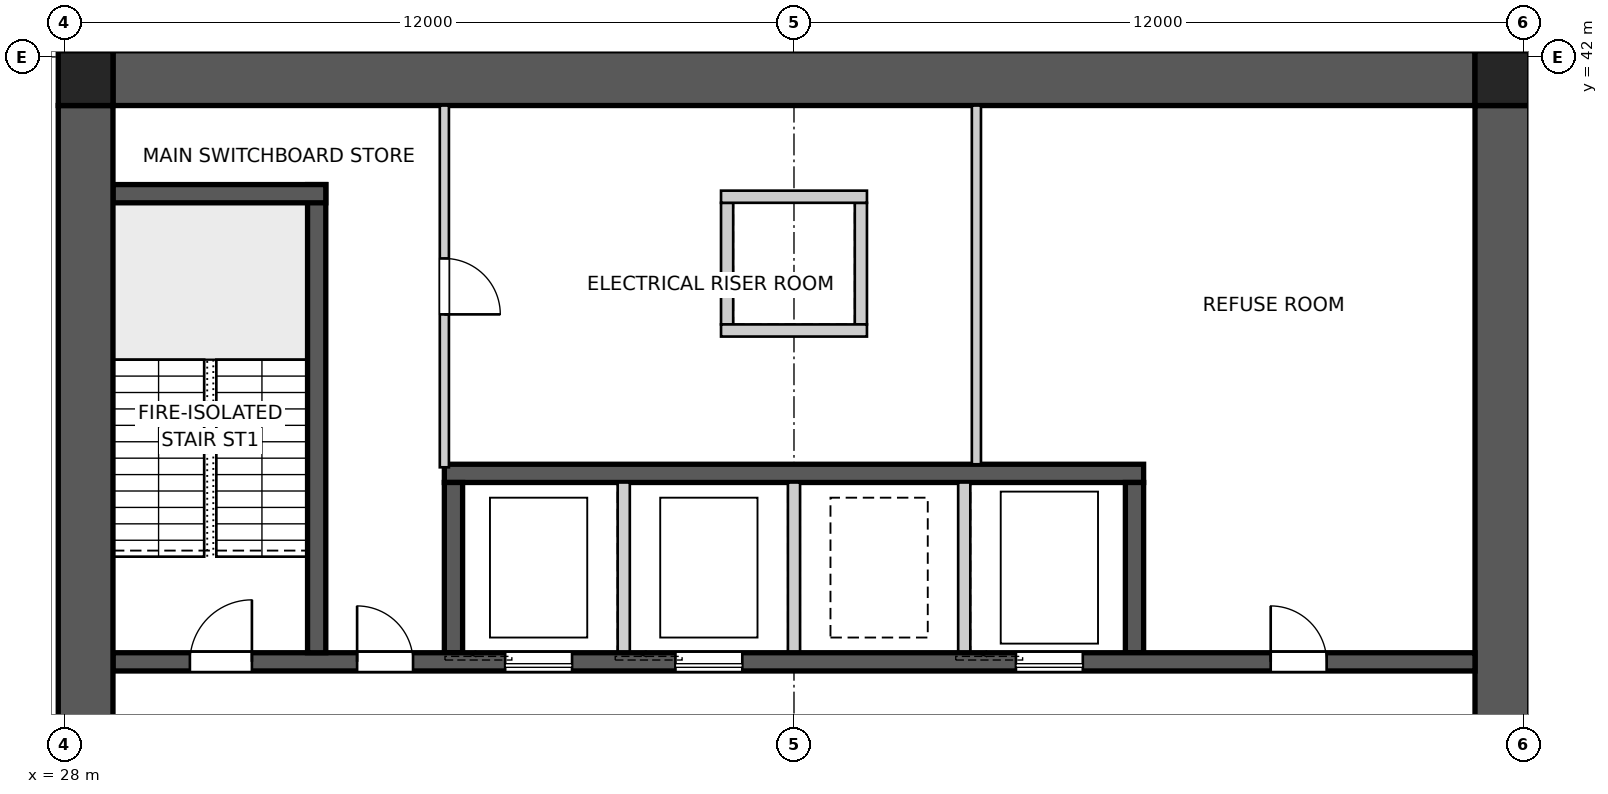
"""IFC4 building model, lengths in metres.
Left out: names, types, materials, properties, quantities, classifications, styles, units other than length and angle.
Written with IfcOpenShell. Run it as: python <this file> out.ifc"""

import sys

from ifc_helpers import new_model, si_unit, direction, frame, frame_2d, origin, origin_2d, place, context, subcontext, project, spatial, polyline, rectangle, outline, extrude, element, fill, save


model = new_model("IFC4")
c1 = context("Model", 3, precision=1e-05, world=origin(), true_north=direction((0.0, 1.0)))
c2 = subcontext(c1, "Body", "Model", "MODEL_VIEW")
j1 = project(units=[si_unit("LENGTHUNIT", "METRE"), si_unit("PLANEANGLEUNIT", "RADIAN")], contexts=[c1])
p1 = place(None, origin())
s1 = spatial("IfcSite", under=j1, at=p1, CompositionType="ELEMENT")
p2 = place(p1, origin())
s2 = spatial("IfcBuilding", under=s1, at=p2, CompositionType="ELEMENT")
p3 = place(p2, frame((0.0, 0.0, 10.5)))
s3 = spatial("IfcBuildingStorey", under=s2, at=p3, CompositionType="ELEMENT", Elevation=10.5)
p4 = place(p3, frame((28.8, 41.65, 0.0), z_axis=(0.0, 0.0, 1.0), x_axis=(1.0, 0.0, 0.0)))
e1 = element("IfcWall", 1, at=p4, inside=s3, PredefinedType="SHEAR", context=c2, shape_type="SweptSolid", body=[
    extrude(outline(polyline([(0.0, -0.45), (22.4, -0.45), (22.4, -0.025), (22.85, -0.025), (22.85, 0.025), (22.4, 0.025), (22.4, 0.45), (0.0, 0.45), (0.0, 0.025), (-0.45, 0.025), (-0.45, -0.025), (0.0, -0.025), (0.0, -0.45)])), origin(), (0.0, 0.0, 1.0), 4.5),
])
p5 = place(p3, frame((51.65, 18.8, 0.0), z_axis=(0.0, 0.0, 1.0), x_axis=(0.0, 1.0, 0.0)))
e2 = element("IfcWall", 2, at=p5, inside=s3, PredefinedType="SHEAR", context=c2, shape_type="SweptSolid", body=[
    extrude(outline(polyline([(0.0, -0.45), (22.4, -0.45), (22.4, -0.025), (22.85, -0.025), (22.85, 0.025), (22.4, 0.025), (22.4, 0.45), (0.0, 0.45), (0.0, 0.025), (-0.45, 0.025), (-0.45, -0.025), (0.0, -0.025), (0.0, -0.45)])), origin(), (0.0, 0.0, 1.0), 4.5),
])
p6 = place(p5, frame((11.14, 0.0, 0.0)))
e3 = element("IfcOpeningElement", 3, at=p6, cuts=e2, PredefinedType="OPENING", context=c2, shape_type="SweptSolid", body=[
    extrude(rectangle(XDim=1.02, YDim=2.4, at=frame_2d((0.51, 1.2))), frame((0.0, 0.46, 0.0), z_axis=(0.0, -1.0, 0.0), x_axis=(1.0, 0.0, 0.0)), (0.0, 0.0, 1.0), 0.92),
])
p7 = place(p3, frame((28.35, 41.2, 0.0), z_axis=(0.0, 0.0, 1.0), x_axis=(0.0, -1.0, 0.0)))
e4 = element("IfcWall", 4, at=p7, inside=s3, PredefinedType="SHEAR", context=c2, shape_type="SweptSolid", body=[
    extrude(outline(polyline([(0.0, -0.45), (22.4, -0.45), (22.4, -0.025), (22.85, -0.025), (22.85, 0.025), (22.4, 0.025), (22.4, 0.45), (0.0, 0.45), (0.0, 0.025), (-0.45, 0.025), (-0.45, -0.025), (0.0, -0.025), (0.0, -0.45)])), origin(), (0.0, 0.0, 1.0), 4.5),
])
p8 = place(p7, frame((11.14, 0.0, 0.0)))
e5 = element("IfcOpeningElement", 5, at=p8, cuts=e4, PredefinedType="OPENING", context=c2, shape_type="SweptSolid", body=[
    extrude(rectangle(XDim=1.02, YDim=2.4, at=frame_2d((0.51, 1.2))), frame((0.0, 0.46, 0.0), z_axis=(0.0, -1.0, 0.0), x_axis=(1.0, 0.0, 0.0)), (0.0, 0.0, 1.0), 0.92),
])
p9 = place(p3, frame((28.8, 32.05, 0.0), z_axis=(0.0, 0.0, 1.0), x_axis=(1.0, 0.0, 0.0)))
e6 = element("IfcWall", 6, at=p9, inside=s3, PredefinedType="SHEAR", context=c2, shape_type="SweptSolid", body=[
    extrude(rectangle(XDim=22.4, YDim=0.3, at=frame_2d((11.2, 0.0))), origin(), (0.0, 0.0, 1.0), 4.5),
])
p10 = place(p9, frame((19.04, 0.0, 0.0)))
e7 = element("IfcOpeningElement", 7, at=p10, cuts=e6, PredefinedType="OPENING", context=c2, shape_type="SweptSolid", body=[
    extrude(rectangle(XDim=0.92, YDim=2.1, at=frame_2d((0.46, 1.05))), frame((0.0, 0.16, 0.0), z_axis=(0.0, -1.0, 0.0), x_axis=(1.0, 0.0, 0.0)), (0.0, 0.0, 1.0), 0.32),
])
p11 = place(p9, frame((1.265, 0.0, 0.0)))
e8 = element("IfcOpeningElement", 8, at=p11, cuts=e6, PredefinedType="OPENING", context=c2, shape_type="SweptSolid", body=[
    extrude(rectangle(XDim=1.02, YDim=2.1, at=frame_2d((0.51, 1.05))), frame((0.0, 0.16, 0.0), z_axis=(0.0, -1.0, 0.0), x_axis=(1.0, 0.0, 0.0)), (0.0, 0.0, 1.0), 0.32),
])
p12 = place(p9, frame((4.015, 0.0, 0.0)))
e9 = element("IfcOpeningElement", 9, at=p12, cuts=e6, PredefinedType="OPENING", context=c2, shape_type="SweptSolid", body=[
    extrude(rectangle(XDim=0.92, YDim=2.1, at=frame_2d((0.46, 1.05))), frame((0.0, 0.16, 0.0), z_axis=(0.0, -1.0, 0.0), x_axis=(1.0, 0.0, 0.0)), (0.0, 0.0, 1.0), 0.32),
])
p13 = place(p9, frame((6.45, 0.0, 0.0)))
e10 = element("IfcOpeningElement", 10, at=p13, cuts=e6, PredefinedType="OPENING", context=c2, shape_type="SweptSolid", body=[
    extrude(rectangle(XDim=1.1, YDim=2.1, at=frame_2d((0.55, 1.05))), frame((0.0, 0.16, 0.0), z_axis=(0.0, -1.0, 0.0), x_axis=(1.0, 0.0, 0.0)), (0.0, 0.0, 1.0), 0.32),
])
p14 = place(p9, frame((9.25, 0.0, 0.0)))
e11 = element("IfcOpeningElement", 11, at=p14, cuts=e6, PredefinedType="OPENING", context=c2, shape_type="SweptSolid", body=[
    extrude(rectangle(XDim=1.1, YDim=2.1, at=frame_2d((0.55, 1.05))), frame((0.0, 0.16, 0.0), z_axis=(0.0, -1.0, 0.0), x_axis=(1.0, 0.0, 0.0)), (0.0, 0.0, 1.0), 0.32),
])
p15 = place(p9, frame((14.85, 0.0, 0.0)))
e12 = element("IfcOpeningElement", 12, at=p15, cuts=e6, PredefinedType="OPENING", context=c2, shape_type="SweptSolid", body=[
    extrude(rectangle(XDim=1.1, YDim=2.1, at=frame_2d((0.55, 1.05))), frame((0.0, 0.16, 0.0), z_axis=(0.0, -1.0, 0.0), x_axis=(1.0, 0.0, 0.0)), (0.0, 0.0, 1.0), 0.32),
])
p16 = place(p3, frame((34.25, 35.15, 0.0), z_axis=(0.0, 0.0, 1.0), x_axis=(1.0, 0.0, 0.0)))
e13 = element("IfcWall", 13, at=p16, inside=s3, PredefinedType="SHEAR", context=c2, shape_type="SweptSolid", body=[
    extrude(rectangle(XDim=11.5, YDim=0.3, at=frame_2d((5.75, 0.0))), origin(), (0.0, 0.0, 1.0), 4.5),
])
p17 = place(p3, frame((34.4, 32.2, 0.0), z_axis=(0.0, 0.0, 1.0), x_axis=(0.0, 1.0, 0.0)))
e14 = element("IfcWall", 14, at=p17, inside=s3, PredefinedType="SHEAR", context=c2, shape_type="SweptSolid", body=[
    extrude(rectangle(XDim=2.8, YDim=0.3, at=frame_2d((1.4, 0.0))), origin(), (0.0, 0.0, 1.0), 4.5),
])
for number, where, z_axis, x_axis in (
    (15, (37.2, 32.2, 0.0), (0.0, 0.0, 1.0), (0.0, 1.0, 0.0)),
    (16, (40.0, 32.2, 0.0), (0.0, 0.0, 1.0), (0.0, 1.0, 0.0)),
    (17, (42.8, 32.2, 0.0), (0.0, 0.0, 1.0), (0.0, 1.0, 0.0)),
):
    element("IfcWall", number, at=place(p3, frame(where, z_axis=z_axis, x_axis=x_axis)), inside=s3, PredefinedType="SOLIDWALL", context=c2, shape_type="SweptSolid", body=[
        extrude(rectangle(XDim=2.8, YDim=0.2, at=frame_2d((1.4, 0.0))), origin(), (0.0, 0.0, 1.0), 4.5),
    ])
p18 = place(p3, frame((45.6, 32.2, 0.0), z_axis=(0.0, 0.0, 1.0), x_axis=(0.0, 1.0, 0.0)))
e18 = element("IfcWall", 18, at=p18, inside=s3, PredefinedType="SHEAR", context=c2, shape_type="SweptSolid", body=[
    extrude(rectangle(XDim=2.8, YDim=0.3, at=frame_2d((1.4, 0.0))), origin(), (0.0, 0.0, 1.0), 4.5),
])
p19 = place(p3, frame((32.15, 32.2, 0.0), z_axis=(0.0, 0.0, 1.0), x_axis=(0.0, 1.0, 0.0)))
e19 = element("IfcWall", 19, at=p19, inside=s3, PredefinedType="SHEAR", context=c2, shape_type="SweptSolid", body=[
    extrude(rectangle(XDim=7.7, YDim=0.3, at=frame_2d((3.85, 0.0))), origin(), (0.0, 0.0, 1.0), 4.5),
])
p20 = place(p3, frame((28.8, 39.75, 0.0), z_axis=(0.0, 0.0, 1.0), x_axis=(1.0, 0.0, 0.0)))
e20 = element("IfcWall", 20, at=p20, inside=s3, PredefinedType="SHEAR", context=c2, shape_type="SweptSolid", body=[
    extrude(rectangle(XDim=3.5, YDim=0.3, at=frame_2d((1.75, 0.0))), origin(), (0.0, 0.0, 1.0), 4.5),
])
for number, where, z_axis, x_axis in (
    (21, (38.9, 37.6, 0.0), (0.0, 0.0, 1.0), (0.0, 1.0, 0.0)),
    (22, (41.1, 37.6, 0.0), (0.0, 0.0, 1.0), (0.0, 1.0, 0.0)),
):
    element("IfcWall", number, at=place(p3, frame(where, z_axis=z_axis, x_axis=x_axis)), inside=s3, PredefinedType="SOLIDWALL", context=c2, shape_type="SweptSolid", body=[
        extrude(rectangle(XDim=2.0, YDim=0.2, at=frame_2d((1.0, 0.0))), origin(), (0.0, 0.0, 1.0), 4.5),
    ])
for number, where, z_axis, x_axis in (
    (23, (38.8, 37.5, 0.0), (0.0, 0.0, 1.0), (1.0, 0.0, 0.0)),
    (24, (38.8, 39.7, 0.0), (0.0, 0.0, 1.0), (1.0, 0.0, 0.0)),
):
    element("IfcWall", number, at=place(p3, frame(where, z_axis=z_axis, x_axis=x_axis)), inside=s3, PredefinedType="SOLIDWALL", context=c2, shape_type="SweptSolid", body=[
        extrude(rectangle(XDim=2.4, YDim=0.2, at=frame_2d((1.2, 0.0))), origin(), (0.0, 0.0, 1.0), 4.5),
    ])
for number, where, z_axis, x_axis in (
    (25, (51.65, 41.65, 0.0), (0.0, 0.0, 1.0), (1.0, 0.0, 0.0)),
    (26, (28.35, 41.65, 0.0), (0.0, 0.0, 1.0), (1.0, 0.0, 0.0)),
):
    element("IfcColumn", number, at=place(p3, frame(where, z_axis=z_axis, x_axis=x_axis)), inside=s3, PredefinedType="COLUMN", context=c2, shape_type="SweptSolid", body=[
        extrude(rectangle(XDim=0.9, YDim=0.9, at=origin_2d()), origin(), (0.0, 0.0, 1.0), 4.5),
    ])
p21 = place(p3, frame((34.25, 41.2, 0.0), z_axis=(0.0, 0.0, 1.0), x_axis=(0.0, -1.0, 0.0)))
e27 = element("IfcWall", 27, at=p21, inside=s3, PredefinedType="SOLIDWALL", context=c2, shape_type="SweptSolid", body=[
    extrude(rectangle(XDim=5.95, YDim=0.15, at=frame_2d((2.975, 0.0))), origin(), (0.0, 0.0, 1.0), 4.35),
])
p22 = place(p21, frame((2.515, 0.0, 0.0)))
e28 = element("IfcOpeningElement", 28, at=p22, cuts=e27, PredefinedType="OPENING", context=c2, shape_type="SweptSolid", body=[
    extrude(rectangle(XDim=0.92, YDim=2.1, at=frame_2d((0.46, 1.05))), frame((0.0, 0.085, 0.0), z_axis=(0.0, -1.0, 0.0), x_axis=(1.0, 0.0, 0.0)), (0.0, 0.0, 1.0), 0.17),
])
p23 = place(p3, frame((43.0, 41.2, 0.0), z_axis=(0.0, 0.0, 1.0), x_axis=(0.0, -1.0, 0.0)))
e29 = element("IfcWall", 29, at=p23, inside=s3, PredefinedType="SOLIDWALL", context=c2, shape_type="SweptSolid", body=[
    extrude(rectangle(XDim=5.9, YDim=0.15, at=frame_2d((2.95, 0.0))), origin(), (0.0, 0.0, 1.0), 4.35),
])
p24 = place(p10, origin())
e30 = element("IfcDoor", 30, at=p24, inside=s3, OperationType="SINGLE_SWING_LEFT", PredefinedType="DOOR", context=c2, shape_type="SweptSolid", body=[
    extrude(rectangle(XDim=0.92, YDim=2.1, at=frame_2d((0.46, 1.05))), frame((0.0, 0.025, 0.0), z_axis=(0.0, -1.0, 0.0), x_axis=(1.0, 0.0, 0.0)), (0.0, 0.0, 1.0), 0.05),
])
fill(e7, e30)
p25 = place(p11, origin())
e31 = element("IfcDoor", 31, at=p25, inside=s3, OperationType="SINGLE_SWING_RIGHT", PredefinedType="DOOR", context=c2, shape_type="SweptSolid", body=[
    extrude(rectangle(XDim=1.02, YDim=2.1, at=frame_2d((0.51, 1.05))), frame((0.0, 0.025, 0.0), z_axis=(0.0, -1.0, 0.0), x_axis=(1.0, 0.0, 0.0)), (0.0, 0.0, 1.0), 0.05),
])
fill(e8, e31)
p26 = place(p12, origin())
e32 = element("IfcDoor", 32, at=p26, inside=s3, OperationType="SINGLE_SWING_LEFT", PredefinedType="DOOR", context=c2, shape_type="SweptSolid", body=[
    extrude(rectangle(XDim=0.92, YDim=2.1, at=frame_2d((0.46, 1.05))), frame((0.0, 0.025, 0.0), z_axis=(0.0, -1.0, 0.0), x_axis=(1.0, 0.0, 0.0)), (0.0, 0.0, 1.0), 0.05),
])
fill(e9, e32)
p27 = place(p22, origin())
e33 = element("IfcDoor", 33, at=p27, inside=s3, OperationType="SINGLE_SWING_RIGHT", PredefinedType="DOOR", context=c2, shape_type="SweptSolid", body=[
    extrude(rectangle(XDim=0.92, YDim=2.1, at=frame_2d((0.46, 1.05))), frame((0.0, 0.025, 0.0), z_axis=(0.0, -1.0, 0.0), x_axis=(1.0, 0.0, 0.0)), (0.0, 0.0, 1.0), 0.05),
])
fill(e28, e33)
p28 = place(p13, origin())
e34 = element("IfcDoor", 34, at=p28, inside=s3, OperationType="SLIDING_TO_LEFT", PredefinedType="DOOR", context=c2, shape_type="SweptSolid", body=[
    extrude(rectangle(XDim=1.1, YDim=2.1, at=frame_2d((0.55, 1.05))), frame((0.0, 0.025, 0.0), z_axis=(0.0, -1.0, 0.0), x_axis=(1.0, 0.0, 0.0)), (0.0, 0.0, 1.0), 0.05),
])
fill(e10, e34)
p29 = place(p14, origin())
e35 = element("IfcDoor", 35, at=p29, inside=s3, OperationType="SLIDING_TO_LEFT", PredefinedType="DOOR", context=c2, shape_type="SweptSolid", body=[
    extrude(rectangle(XDim=1.1, YDim=2.1, at=frame_2d((0.55, 1.05))), frame((0.0, 0.025, 0.0), z_axis=(0.0, -1.0, 0.0), x_axis=(1.0, 0.0, 0.0)), (0.0, 0.0, 1.0), 0.05),
])
fill(e11, e35)
p30 = place(p15, origin())
e36 = element("IfcDoor", 36, at=p30, inside=s3, OperationType="SLIDING_TO_LEFT", PredefinedType="DOOR", context=c2, shape_type="SweptSolid", body=[
    extrude(rectangle(XDim=1.1, YDim=2.1, at=frame_2d((0.55, 1.05))), frame((0.0, 0.025, 0.0), z_axis=(0.0, -1.0, 0.0), x_axis=(1.0, 0.0, 0.0)), (0.0, 0.0, 1.0), 0.05),
])
fill(e12, e36)
save(model, sys.argv[1])
